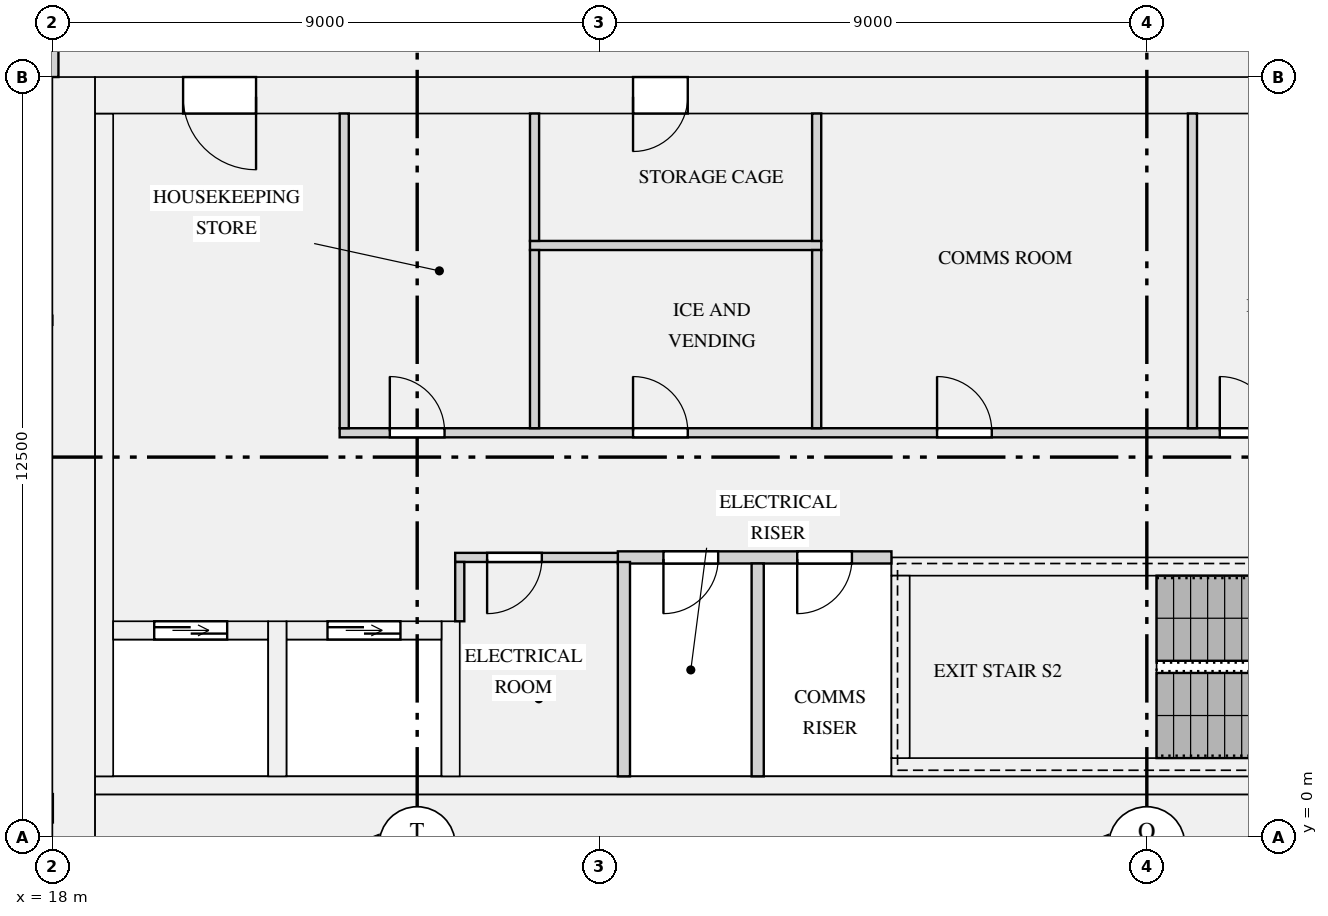
"""IFC4 building model, lengths in metres.
Left out: names, types, materials, properties, quantities, classifications, styles, units other than length and angle.
Written with IfcOpenShell. Run it as: python <this file> out.ifc"""

import sys

from ifc_helpers import new_model, si_unit, direction, frame, frame_2d, origin, place, context, subcontext, project, spatial, rectangle, extrude, element, fill, save


model = new_model("IFC4")
c1 = context("Model", 3, precision=1e-05, world=origin(), true_north=direction((0.0, 1.0)))
c2 = subcontext(c1, "Body", "Model", "MODEL_VIEW")
j1 = project(units=[si_unit("LENGTHUNIT", "METRE"), si_unit("PLANEANGLEUNIT", "RADIAN")], contexts=[c1])
p1 = place(None, origin())
s1 = spatial("IfcSite", under=j1, at=p1, CompositionType="ELEMENT")
p2 = place(p1, origin())
s2 = spatial("IfcBuilding", under=s1, at=p2, CompositionType="ELEMENT")
p3 = place(p2, frame((0.0, 0.0, 166.5)))
s3 = spatial("IfcBuildingStorey", under=s2, at=p3, CompositionType="ELEMENT", Elevation=166.5)
p4 = place(p3, frame((18.35, 0.0, 0.0), z_axis=(0.0, 0.0, 1.0), x_axis=(0.0, 1.0, 0.0)))
e1 = element("IfcWall", 1, at=p4, inside=s3, PredefinedType="SHEAR", context=c2, shape_type="SweptSolid", body=[
    extrude(rectangle(XDim=12.5, YDim=0.7, at=frame_2d((6.25, 0.0))), origin(), (0.0, 0.0, 1.0), 3.15),
])
p5 = place(p3, frame((18.7, 0.35, 0.0), z_axis=(0.0, 0.0, 1.0), x_axis=(1.0, 0.0, 0.0)))
e2 = element("IfcWall", 2, at=p5, inside=s3, PredefinedType="SHEAR", context=c2, shape_type="SweptSolid", body=[
    extrude(rectangle(XDim=34.6, YDim=0.7, at=frame_2d((17.3, 0.0))), origin(), (0.0, 0.0, 1.0), 3.15),
])
p6 = place(p3, frame((18.7, 12.2, 0.0), z_axis=(0.0, 0.0, 1.0), x_axis=(1.0, 0.0, 0.0)))
e3 = element("IfcWall", 3, at=p6, inside=s3, PredefinedType="SHEAR", context=c2, shape_type="SweptSolid", body=[
    extrude(rectangle(XDim=34.6, YDim=0.6, at=frame_2d((17.3, 0.0))), origin(), (0.0, 0.0, 1.0), 3.15),
])
p7 = place(p6, frame((24.475, 0.0, 0.0)))
e4 = element("IfcOpeningElement", 4, at=p7, cuts=e3, PredefinedType="OPENING", context=c2, shape_type="SweptSolid", body=[
    extrude(rectangle(XDim=1.1, YDim=2.1, at=frame_2d((0.55, 1.05))), frame((0.0, 0.31, 0.0), z_axis=(0.0, -1.0, 0.0), x_axis=(1.0, 0.0, 0.0)), (0.0, 0.0, 1.0), 0.62),
])
p8 = place(p6, frame((26.725, 0.0, 0.0)))
e5 = element("IfcOpeningElement", 5, at=p8, cuts=e3, PredefinedType="OPENING", context=c2, shape_type="SweptSolid", body=[
    extrude(rectangle(XDim=1.1, YDim=2.1, at=frame_2d((0.55, 1.05))), frame((0.0, 0.31, 0.0), z_axis=(0.0, -1.0, 0.0), x_axis=(1.0, 0.0, 0.0)), (0.0, 0.0, 1.0), 0.62),
])
p9 = place(p6, frame((28.975, 0.0, 0.0)))
e6 = element("IfcOpeningElement", 6, at=p9, cuts=e3, PredefinedType="OPENING", context=c2, shape_type="SweptSolid", body=[
    extrude(rectangle(XDim=1.1, YDim=2.1, at=frame_2d((0.55, 1.05))), frame((0.0, 0.31, 0.0), z_axis=(0.0, -1.0, 0.0), x_axis=(1.0, 0.0, 0.0)), (0.0, 0.0, 1.0), 0.62),
])
p10 = place(p6, frame((8.85, 0.0, 0.0)))
e7 = element("IfcOpeningElement", 7, at=p10, cuts=e3, PredefinedType="OPENING", context=c2, shape_type="SweptSolid", body=[
    extrude(rectangle(XDim=0.9, YDim=2.1, at=frame_2d((0.45, 1.05))), frame((0.0, 0.31, 0.0), z_axis=(0.0, -1.0, 0.0), x_axis=(1.0, 0.0, 0.0)), (0.0, 0.0, 1.0), 0.62),
])
p11 = place(p6, frame((1.45, 0.0, 0.0)))
e8 = element("IfcOpeningElement", 8, at=p11, cuts=e3, PredefinedType="OPENING", context=c2, shape_type="SweptSolid", body=[
    extrude(rectangle(XDim=1.2, YDim=2.1, at=frame_2d((0.6, 1.05))), frame((0.0, 0.31, 0.0), z_axis=(0.0, -1.0, 0.0), x_axis=(1.0, 0.0, 0.0)), (0.0, 0.0, 1.0), 0.62),
])
p12 = place(p6, frame((31.95, 0.0, 0.0)))
e9 = element("IfcOpeningElement", 9, at=p12, cuts=e3, PredefinedType="OPENING", context=c2, shape_type="SweptSolid", body=[
    extrude(rectangle(XDim=1.2, YDim=2.1, at=frame_2d((0.6, 1.05))), frame((0.0, 0.31, 0.0), z_axis=(0.0, -1.0, 0.0), x_axis=(1.0, 0.0, 0.0)), (0.0, 0.0, 1.0), 0.62),
])
p13 = place(p3, frame((18.85, 1.0, 0.0), z_axis=(0.0, 0.0, 1.0), x_axis=(0.0, 1.0, 0.0)))
e10 = element("IfcWall", 10, at=p13, inside=s3, PredefinedType="SHEAR", context=c2, shape_type="SweptSolid", body=[
    extrude(rectangle(XDim=10.9, YDim=0.3, at=frame_2d((5.45, 0.0))), origin(), (0.0, 0.0, 1.0), 3.15),
])
p14 = place(p3, frame((18.7, 0.85, 0.0), z_axis=(0.0, 0.0, 1.0), x_axis=(1.0, 0.0, 0.0)))
e11 = element("IfcWall", 11, at=p14, inside=s3, PredefinedType="SHEAR", context=c2, shape_type="SweptSolid", body=[
    extrude(rectangle(XDim=34.6, YDim=0.3, at=frame_2d((17.3, 0.0))), origin(), (0.0, 0.0, 1.0), 3.15),
])
p15 = place(p3, frame((19.0, 3.4, 0.0), z_axis=(0.0, 0.0, 1.0), x_axis=(1.0, 0.0, 0.0)))
e12 = element("IfcWall", 12, at=p15, inside=s3, PredefinedType="SHEAR", context=c2, shape_type="SweptSolid", body=[
    extrude(rectangle(XDim=2.55, YDim=0.3, at=frame_2d((1.275, 0.0))), origin(), (0.0, 0.0, 1.0), 3.15),
])
p16 = place(p15, frame((0.675, 0.0, 0.0)))
e13 = element("IfcOpeningElement", 13, at=p16, cuts=e12, PredefinedType="OPENING", context=c2, shape_type="SweptSolid", body=[
    extrude(rectangle(XDim=1.2, YDim=2.1, at=frame_2d((0.6, 1.05))), frame((0.0, 0.16, 0.0), z_axis=(0.0, -1.0, 0.0), x_axis=(1.0, 0.0, 0.0)), (0.0, 0.0, 1.0), 0.32),
])
p17 = place(p3, frame((21.85, 3.4, 0.0), z_axis=(0.0, 0.0, 1.0), x_axis=(1.0, 0.0, 0.0)))
e14 = element("IfcWall", 14, at=p17, inside=s3, PredefinedType="SHEAR", context=c2, shape_type="SweptSolid", body=[
    extrude(rectangle(XDim=2.55, YDim=0.3, at=frame_2d((1.275, 0.0))), origin(), (0.0, 0.0, 1.0), 3.15),
])
p18 = place(p17, frame((0.675, 0.0, 0.0)))
e15 = element("IfcOpeningElement", 15, at=p18, cuts=e14, PredefinedType="OPENING", context=c2, shape_type="SweptSolid", body=[
    extrude(rectangle(XDim=1.2, YDim=2.1, at=frame_2d((0.6, 1.05))), frame((0.0, 0.16, 0.0), z_axis=(0.0, -1.0, 0.0), x_axis=(1.0, 0.0, 0.0)), (0.0, 0.0, 1.0), 0.32),
])
for number, where, z_axis, x_axis in (
    (16, (21.7, 1.0, 0.0), (0.0, 0.0, 1.0), (0.0, 1.0, 0.0)),
    (17, (24.55, 1.0, 0.0), (0.0, 0.0, 1.0), (0.0, 1.0, 0.0)),
):
    element("IfcWall", number, at=place(p3, frame(where, z_axis=z_axis, x_axis=x_axis)), inside=s3, PredefinedType="SHEAR", context=c2, shape_type="SweptSolid", body=[
        extrude(rectangle(XDim=2.55, YDim=0.3, at=frame_2d((1.275, 0.0))), origin(), (0.0, 0.0, 1.0), 3.15),
    ])
p19 = place(p3, frame((31.8, 1.15, 0.0), z_axis=(0.0, 0.0, 1.0), x_axis=(1.0, 0.0, 0.0)))
e18 = element("IfcWall", 18, at=p19, inside=s3, PredefinedType="SHEAR", context=c2, shape_type="SweptSolid", body=[
    extrude(rectangle(XDim=8.4, YDim=0.3, at=frame_2d((4.2, 0.0))), origin(), (0.0, 0.0, 1.0), 3.15),
])
p20 = place(p3, frame((31.8, 4.45, 0.0), z_axis=(0.0, 0.0, 1.0), x_axis=(1.0, 0.0, 0.0)))
e19 = element("IfcWall", 19, at=p20, inside=s3, PredefinedType="SHEAR", context=c2, shape_type="SweptSolid", body=[
    extrude(rectangle(XDim=8.4, YDim=0.3, at=frame_2d((4.2, 0.0))), origin(), (0.0, 0.0, 1.0), 3.15),
])
p21 = place(p20, frame((6.8, 0.0, 0.0)))
e20 = element("IfcOpeningElement", 20, at=p21, cuts=e19, PredefinedType="OPENING", context=c2, shape_type="SweptSolid", body=[
    extrude(rectangle(XDim=1.1, YDim=2.1, at=frame_2d((0.55, 1.05))), frame((0.0, 0.16, 0.0), z_axis=(0.0, -1.0, 0.0), x_axis=(1.0, 0.0, 0.0)), (0.0, 0.0, 1.0), 0.32),
])
p22 = place(p3, frame((31.95, 1.3, 0.0), z_axis=(0.0, 0.0, 1.0), x_axis=(0.0, 1.0, 0.0)))
e21 = element("IfcWall", 21, at=p22, inside=s3, PredefinedType="SHEAR", context=c2, shape_type="SweptSolid", body=[
    extrude(rectangle(XDim=3.0, YDim=0.3, at=frame_2d((1.5, 0.0))), origin(), (0.0, 0.0, 1.0), 3.15),
])
p23 = place(p3, frame((27.3, 4.6, 0.0), z_axis=(0.0, 0.0, 1.0), x_axis=(1.0, 0.0, 0.0)))
e22 = element("IfcWall", 22, at=p23, inside=s3, PredefinedType="PARTITIONING", context=c2, shape_type="SweptSolid", body=[
    extrude(rectangle(XDim=4.5, YDim=0.2, at=frame_2d((2.25, 0.0))), origin(), (0.0, 0.0, 1.0), 2.83),
])
p24 = place(p23, frame((0.75, 0.0, 0.0)))
e23 = element("IfcOpeningElement", 23, at=p24, cuts=e22, PredefinedType="OPENING", context=c2, shape_type="SweptSolid", body=[
    extrude(rectangle(XDim=0.9, YDim=2.1, at=frame_2d((0.45, 1.05))), frame((0.0, 0.11, 0.0), z_axis=(0.0, -1.0, 0.0), x_axis=(1.0, 0.0, 0.0)), (0.0, 0.0, 1.0), 0.22),
])
p25 = place(p23, frame((2.95, 0.0, 0.0)))
e24 = element("IfcOpeningElement", 24, at=p25, cuts=e22, PredefinedType="OPENING", context=c2, shape_type="SweptSolid", body=[
    extrude(rectangle(XDim=0.9, YDim=2.1, at=frame_2d((0.45, 1.05))), frame((0.0, 0.11, 0.0), z_axis=(0.0, -1.0, 0.0), x_axis=(1.0, 0.0, 0.0)), (0.0, 0.0, 1.0), 0.22),
])
p26 = place(p3, frame((24.625, 4.6, 0.0), z_axis=(0.0, 0.0, 1.0), x_axis=(1.0, 0.0, 0.0)))
e25 = element("IfcWall", 25, at=p26, inside=s3, PredefinedType="PARTITIONING", context=c2, shape_type="SweptSolid", body=[
    extrude(rectangle(XDim=2.675, YDim=0.15, at=frame_2d((1.337, 0.0))), origin(), (0.0, 0.0, 1.0), 2.83),
])
p27 = place(p26, frame((0.525, 0.0, 0.0)))
e26 = element("IfcOpeningElement", 26, at=p27, cuts=e25, PredefinedType="OPENING", context=c2, shape_type="SweptSolid", body=[
    extrude(rectangle(XDim=0.9, YDim=2.1, at=frame_2d((0.45, 1.05))), frame((0.0, 0.085, 0.0), z_axis=(0.0, -1.0, 0.0), x_axis=(1.0, 0.0, 0.0)), (0.0, 0.0, 1.0), 0.17),
])
p28 = place(p3, frame((22.725, 6.65, 0.0), z_axis=(0.0, 0.0, 1.0), x_axis=(1.0, 0.0, 0.0)))
e27 = element("IfcWall", 27, at=p28, inside=s3, PredefinedType="PARTITIONING", context=c2, shape_type="SweptSolid", body=[
    extrude(rectangle(XDim=19.8, YDim=0.15, at=frame_2d((9.9, 0.0))), origin(), (0.0, 0.0, 1.0), 2.83),
])
p29 = place(p28, frame((0.825, 0.0, 0.0)))
e28 = element("IfcOpeningElement", 28, at=p29, cuts=e27, PredefinedType="OPENING", context=c2, shape_type="SweptSolid", body=[
    extrude(rectangle(XDim=0.9, YDim=2.1, at=frame_2d((0.45, 1.05))), frame((0.0, 0.085, 0.0), z_axis=(0.0, -1.0, 0.0), x_axis=(1.0, 0.0, 0.0)), (0.0, 0.0, 1.0), 0.17),
])
p30 = place(p28, frame((4.825, 0.0, 0.0)))
e29 = element("IfcOpeningElement", 29, at=p30, cuts=e27, PredefinedType="OPENING", context=c2, shape_type="SweptSolid", body=[
    extrude(rectangle(XDim=0.9, YDim=2.1, at=frame_2d((0.45, 1.05))), frame((0.0, 0.085, 0.0), z_axis=(0.0, -1.0, 0.0), x_axis=(1.0, 0.0, 0.0)), (0.0, 0.0, 1.0), 0.17),
])
p31 = place(p28, frame((9.825, 0.0, 0.0)))
e30 = element("IfcOpeningElement", 30, at=p31, cuts=e27, PredefinedType="OPENING", context=c2, shape_type="SweptSolid", body=[
    extrude(rectangle(XDim=0.9, YDim=2.1, at=frame_2d((0.45, 1.05))), frame((0.0, 0.085, 0.0), z_axis=(0.0, -1.0, 0.0), x_axis=(1.0, 0.0, 0.0)), (0.0, 0.0, 1.0), 0.17),
])
p32 = place(p28, frame((14.475, 0.0, 0.0)))
e31 = element("IfcOpeningElement", 31, at=p32, cuts=e27, PredefinedType="OPENING", context=c2, shape_type="SweptSolid", body=[
    extrude(rectangle(XDim=0.9, YDim=2.1, at=frame_2d((0.45, 1.05))), frame((0.0, 0.085, 0.0), z_axis=(0.0, -1.0, 0.0), x_axis=(1.0, 0.0, 0.0)), (0.0, 0.0, 1.0), 0.17),
])
p33 = place(p28, frame((17.825, 0.0, 0.0)))
e32 = element("IfcOpeningElement", 32, at=p33, cuts=e27, PredefinedType="OPENING", context=c2, shape_type="SweptSolid", body=[
    extrude(rectangle(XDim=0.9, YDim=2.1, at=frame_2d((0.45, 1.05))), frame((0.0, 0.085, 0.0), z_axis=(0.0, -1.0, 0.0), x_axis=(1.0, 0.0, 0.0)), (0.0, 0.0, 1.0), 0.17),
])
p34 = place(p3, frame((25.855, 9.73, 0.0), z_axis=(0.0, 0.0, 1.0), x_axis=(1.0, 0.0, 0.0)))
e33 = element("IfcWall", 33, at=p34, inside=s3, PredefinedType="PARTITIONING", context=c2, shape_type="SweptSolid", body=[
    extrude(rectangle(XDim=4.79, YDim=0.15, at=frame_2d((2.395, 0.0))), origin(), (0.0, 0.0, 1.0), 2.83),
])
p35 = place(p3, frame((27.4, 1.0, 0.0), z_axis=(0.0, 0.0, 1.0), x_axis=(0.0, 1.0, 0.0)))
e34 = element("IfcWall", 34, at=p35, inside=s3, PredefinedType="PARTITIONING", context=c2, shape_type="SweptSolid", body=[
    extrude(rectangle(XDim=3.525, YDim=0.2, at=frame_2d((1.762, 0.0))), origin(), (0.0, 0.0, 1.0), 2.83),
])
p36 = place(p3, frame((29.6, 1.0, 0.0), z_axis=(0.0, 0.0, 1.0), x_axis=(0.0, 1.0, 0.0)))
e35 = element("IfcWall", 35, at=p36, inside=s3, PredefinedType="PARTITIONING", context=c2, shape_type="SweptSolid", body=[
    extrude(rectangle(XDim=3.5, YDim=0.2, at=frame_2d((1.75, 0.0))), origin(), (0.0, 0.0, 1.0), 2.83),
])
p37 = place(p3, frame((24.7, 3.55, 0.0), z_axis=(0.0, 0.0, 1.0), x_axis=(0.0, 1.0, 0.0)))
e36 = element("IfcWall", 36, at=p37, inside=s3, PredefinedType="PARTITIONING", context=c2, shape_type="SweptSolid", body=[
    extrude(rectangle(XDim=0.975, YDim=0.15, at=frame_2d((0.487, 0.0))), origin(), (0.0, 0.0, 1.0), 2.83),
])
p38 = place(p3, frame((22.8, 6.725, 0.0), z_axis=(0.0, 0.0, 1.0), x_axis=(0.0, 1.0, 0.0)))
e37 = element("IfcWall", 37, at=p38, inside=s3, PredefinedType="PARTITIONING", context=c2, shape_type="SweptSolid", body=[
    extrude(rectangle(XDim=5.175, YDim=0.15, at=frame_2d((2.587, 0.0))), origin(), (0.0, 0.0, 1.0), 2.83),
])
for number, where, z_axis, x_axis in (
    (38, (25.93, 6.725, 0.0), (0.0, 0.0, 1.0), (0.0, 1.0, 0.0)),
    (39, (30.57, 6.725, 0.0), (0.0, 0.0, 1.0), (0.0, 1.0, 0.0)),
):
    element("IfcWall", number, at=place(p3, frame(where, z_axis=z_axis, x_axis=x_axis)), inside=s3, PredefinedType="PARTITIONING", context=c2, shape_type="SweptSolid", body=[
        extrude(rectangle(XDim=2.93, YDim=0.15, at=frame_2d((1.465, 0.0))), origin(), (0.0, 0.0, 1.0), 2.83),
    ])
p39 = place(p3, frame((36.75, 6.725, 0.0), z_axis=(0.0, 0.0, 1.0), x_axis=(0.0, 1.0, 0.0)))
e40 = element("IfcWall", 40, at=p39, inside=s3, PredefinedType="PARTITIONING", context=c2, shape_type="SweptSolid", body=[
    extrude(rectangle(XDim=5.175, YDim=0.15, at=frame_2d((2.587, 0.0))), origin(), (0.0, 0.0, 1.0), 2.83),
])
for number, where, z_axis, x_axis in (
    (41, (25.93, 9.805, 0.0), (0.0, 0.0, 1.0), (0.0, 1.0, 0.0)),
    (42, (30.57, 9.805, 0.0), (0.0, 0.0, 1.0), (0.0, 1.0, 0.0)),
):
    element("IfcWall", number, at=place(p3, frame(where, z_axis=z_axis, x_axis=x_axis)), inside=s3, PredefinedType="PARTITIONING", context=c2, shape_type="SweptSolid", body=[
        extrude(rectangle(XDim=2.095, YDim=0.15, at=frame_2d((1.047, 0.0))), origin(), (0.0, 0.0, 1.0), 2.83),
    ])
p40 = place(p3, frame((18.0, 12.5, 0.0), z_axis=(0.0, 0.0, 1.0), x_axis=(0.0, 1.0, 0.0)))
e43 = element("IfcWall", 43, at=p40, inside=s3, PredefinedType="PARTITIONING", context=c2, shape_type="SweptSolid", body=[
    extrude(rectangle(XDim=3.4, YDim=0.2, at=frame_2d((1.7, 0.0))), origin(), (0.0, 0.0, 1.0), 2.83),
])
p41 = place(p16, origin())
e44 = element("IfcDoor", 44, at=p41, inside=s3, OperationType="DOUBLE_DOOR_SLIDING", PredefinedType="DOOR", context=c2, shape_type="SweptSolid", body=[
    extrude(rectangle(XDim=1.2, YDim=2.1, at=frame_2d((0.6, 1.05))), frame((0.0, 0.025, 0.0), z_axis=(0.0, -1.0, 0.0), x_axis=(1.0, 0.0, 0.0)), (0.0, 0.0, 1.0), 0.05),
])
fill(e13, e44)
p42 = place(p18, origin())
e45 = element("IfcDoor", 45, at=p42, inside=s3, OperationType="DOUBLE_DOOR_SLIDING", PredefinedType="DOOR", context=c2, shape_type="SweptSolid", body=[
    extrude(rectangle(XDim=1.2, YDim=2.1, at=frame_2d((0.6, 1.05))), frame((0.0, 0.025, 0.0), z_axis=(0.0, -1.0, 0.0), x_axis=(1.0, 0.0, 0.0)), (0.0, 0.0, 1.0), 0.05),
])
fill(e15, e45)
p43 = place(p27, frame((0.9, 0.0, 0.0), z_axis=(0.0, 0.0, 1.0), x_axis=(-1.0, 0.0, 0.0)))
e46 = element("IfcDoor", 46, at=p43, inside=s3, OperationType="SINGLE_SWING_RIGHT", PredefinedType="DOOR", context=c2, shape_type="SweptSolid", body=[
    extrude(rectangle(XDim=0.9, YDim=2.1, at=frame_2d((0.45, 1.05))), frame((0.0, 0.025, 0.0), z_axis=(0.0, -1.0, 0.0), x_axis=(1.0, 0.0, 0.0)), (0.0, 0.0, 1.0), 0.05),
])
fill(e26, e46)
p44 = place(p29, origin())
e47 = element("IfcDoor", 47, at=p44, inside=s3, OperationType="SINGLE_SWING_LEFT", PredefinedType="DOOR", context=c2, shape_type="SweptSolid", body=[
    extrude(rectangle(XDim=0.9, YDim=2.1, at=frame_2d((0.45, 1.05))), frame((0.0, 0.025, 0.0), z_axis=(0.0, -1.0, 0.0), x_axis=(1.0, 0.0, 0.0)), (0.0, 0.0, 1.0), 0.05),
])
fill(e28, e47)
p45 = place(p30, origin())
e48 = element("IfcDoor", 48, at=p45, inside=s3, OperationType="SINGLE_SWING_LEFT", PredefinedType="DOOR", context=c2, shape_type="SweptSolid", body=[
    extrude(rectangle(XDim=0.9, YDim=2.1, at=frame_2d((0.45, 1.05))), frame((0.0, 0.025, 0.0), z_axis=(0.0, -1.0, 0.0), x_axis=(1.0, 0.0, 0.0)), (0.0, 0.0, 1.0), 0.05),
])
fill(e29, e48)
p46 = place(p10, frame((0.9, 0.0, 0.0), z_axis=(0.0, 0.0, 1.0), x_axis=(-1.0, 0.0, 0.0)))
e49 = element("IfcDoor", 49, at=p46, inside=s3, OperationType="SINGLE_SWING_RIGHT", PredefinedType="DOOR", context=c2, shape_type="SweptSolid", body=[
    extrude(rectangle(XDim=0.9, YDim=2.1, at=frame_2d((0.45, 1.05))), frame((0.0, 0.025, 0.0), z_axis=(0.0, -1.0, 0.0), x_axis=(1.0, 0.0, 0.0)), (0.0, 0.0, 1.0), 0.05),
])
fill(e7, e49)
p47 = place(p31, origin())
e50 = element("IfcDoor", 50, at=p47, inside=s3, OperationType="SINGLE_SWING_LEFT", PredefinedType="DOOR", context=c2, shape_type="SweptSolid", body=[
    extrude(rectangle(XDim=0.9, YDim=2.1, at=frame_2d((0.45, 1.05))), frame((0.0, 0.025, 0.0), z_axis=(0.0, -1.0, 0.0), x_axis=(1.0, 0.0, 0.0)), (0.0, 0.0, 1.0), 0.05),
])
fill(e30, e50)
p48 = place(p32, origin())
e51 = element("IfcDoor", 51, at=p48, inside=s3, OperationType="SINGLE_SWING_LEFT", PredefinedType="DOOR", context=c2, shape_type="SweptSolid", body=[
    extrude(rectangle(XDim=0.9, YDim=2.1, at=frame_2d((0.45, 1.05))), frame((0.0, 0.025, 0.0), z_axis=(0.0, -1.0, 0.0), x_axis=(1.0, 0.0, 0.0)), (0.0, 0.0, 1.0), 0.05),
])
fill(e31, e51)
p49 = place(p24, frame((0.9, 0.0, 0.0), z_axis=(0.0, 0.0, 1.0), x_axis=(-1.0, 0.0, 0.0)))
e52 = element("IfcDoor", 52, at=p49, inside=s3, OperationType="SINGLE_SWING_RIGHT", PredefinedType="DOOR", context=c2, shape_type="SweptSolid", body=[
    extrude(rectangle(XDim=0.9, YDim=2.1, at=frame_2d((0.45, 1.05))), frame((0.0, 0.025, 0.0), z_axis=(0.0, -1.0, 0.0), x_axis=(1.0, 0.0, 0.0)), (0.0, 0.0, 1.0), 0.05),
])
fill(e23, e52)
p50 = place(p25, frame((0.9, 0.0, 0.0), z_axis=(0.0, 0.0, 1.0), x_axis=(-1.0, 0.0, 0.0)))
e53 = element("IfcDoor", 53, at=p50, inside=s3, OperationType="SINGLE_SWING_RIGHT", PredefinedType="DOOR", context=c2, shape_type="SweptSolid", body=[
    extrude(rectangle(XDim=0.9, YDim=2.1, at=frame_2d((0.45, 1.05))), frame((0.0, 0.025, 0.0), z_axis=(0.0, -1.0, 0.0), x_axis=(1.0, 0.0, 0.0)), (0.0, 0.0, 1.0), 0.05),
])
fill(e24, e53)
p51 = place(p11, frame((1.2, 0.0, 0.0), z_axis=(0.0, 0.0, 1.0), x_axis=(-1.0, 0.0, 0.0)))
e54 = element("IfcDoor", 54, at=p51, inside=s3, OperationType="SINGLE_SWING_LEFT", PredefinedType="DOOR", context=c2, shape_type="SweptSolid", body=[
    extrude(rectangle(XDim=1.2, YDim=2.1, at=frame_2d((0.6, 1.05))), frame((0.0, 0.025, 0.0), z_axis=(0.0, -1.0, 0.0), x_axis=(1.0, 0.0, 0.0)), (0.0, 0.0, 1.0), 0.05),
])
fill(e8, e54)
save(model, sys.argv[1])
